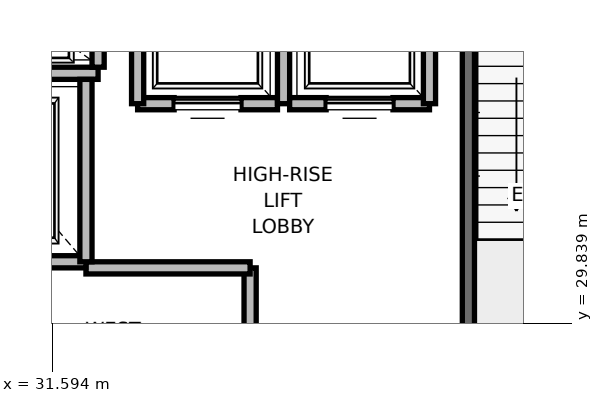
"""IFC4 building model, lengths in metres.
Left out: names, types, materials, properties, quantities, classifications, styles, units other than length and angle.
Written with IfcOpenShell. Run it as: python <this file> out.ifc"""

import sys

from ifc_helpers import new_model, si_unit, direction, frame, frame_2d, origin, place, context, subcontext, project, spatial, rectangle, extrude, element, fill, save


model = new_model("IFC4")
c1 = context("Model", 3, precision=1e-05, world=origin(), true_north=direction((0.0, 1.0)))
c2 = subcontext(c1, "Body", "Model", "MODEL_VIEW")
j1 = project(units=[si_unit("LENGTHUNIT", "METRE"), si_unit("PLANEANGLEUNIT", "RADIAN")], contexts=[c1])
p1 = place(None, origin())
s1 = spatial("IfcSite", under=j1, at=p1, CompositionType="ELEMENT")
p2 = place(p1, origin())
s2 = spatial("IfcBuilding", under=s1, at=p2, CompositionType="ELEMENT")
p3 = place(p2, frame((0.0, 0.0, 318.8)))
s3 = spatial("IfcBuildingStorey", under=s2, at=p3, CompositionType="ELEMENT", Elevation=318.8)
p4 = place(p3, frame((38.44, 27.38, 0.0), z_axis=(0.0, 0.0, 1.0), x_axis=(0.0, 1.0, 0.0)))
e1 = element("IfcWall", 1, at=p4, inside=s3, PredefinedType="SOLIDWALL", context=c2, shape_type="SweptSolid", body=[
    extrude(rectangle(XDim=8.87, YDim=0.2, at=frame_2d((4.435, 0.0))), origin(), (0.0, 0.0, 1.0), 3.785),
])
p5 = place(p3, frame((34.85, 27.38, 0.0), z_axis=(0.0, 0.0, 1.0), x_axis=(0.0, 1.0, 0.0)))
e2 = element("IfcWall", 2, at=p5, inside=s3, PredefinedType="PARTITIONING", context=c2, shape_type="SweptSolid", body=[
    extrude(rectangle(XDim=3.37, YDim=0.2, at=frame_2d((1.685, 0.0))), origin(), (0.0, 0.0, 1.0), 3.785),
])
p6 = place(p5, frame((1.11, 0.0, 0.0)))
e3 = element("IfcOpeningElement", 3, at=p6, cuts=e2, PredefinedType="OPENING", context=c2, shape_type="SweptSolid", body=[
    extrude(rectangle(XDim=1.15, YDim=2.2, at=frame_2d((0.575, 1.1))), frame((0.0, 0.1, 0.0), z_axis=(0.0, -1.0, 0.0), x_axis=(1.0, 0.0, 0.0)), (0.0, 0.0, 1.0), 0.2),
])
p7 = place(p3, frame((32.15, 30.75, 0.0), z_axis=(0.0, 0.0, 1.0), x_axis=(1.0, 0.0, 0.0)))
e4 = element("IfcWall", 4, at=p7, inside=s3, PredefinedType="PARTITIONING", context=c2, shape_type="SweptSolid", body=[
    extrude(rectangle(XDim=2.7, YDim=0.2, at=frame_2d((1.35, 0.0))), origin(), (0.0, 0.0, 1.0), 3.785),
])
p8 = place(p3, frame((29.55, 30.85, 0.0), z_axis=(0.0, 0.0, 1.0), x_axis=(1.0, 0.0, 0.0)))
e5 = element("IfcWall", 5, at=p8, inside=s3, PredefinedType="SOLIDWALL", context=c2, shape_type="SweptSolid", body=[
    extrude(rectangle(XDim=2.6, YDim=0.2, at=frame_2d((1.3, 0.0))), origin(), (0.0, 0.0, 1.0), 2.865),
])
p9 = place(p8, frame((0.75, 0.0, 0.0)))
e6 = element("IfcOpeningElement", 6, at=p9, cuts=e5, PredefinedType="OPENING", context=c2, shape_type="SweptSolid", body=[
    extrude(rectangle(XDim=1.1, YDim=2.2, at=frame_2d((0.55, 1.1))), frame((0.0, 0.1, 0.0), z_axis=(0.0, -1.0, 0.0), x_axis=(1.0, 0.0, 0.0)), (0.0, 0.0, 1.0), 0.2),
])
p10 = place(p3, frame((29.55, 33.95, 0.0), z_axis=(0.0, 0.0, 1.0), x_axis=(1.0, 0.0, 0.0)))
e7 = element("IfcWall", 7, at=p10, inside=s3, PredefinedType="SOLIDWALL", context=c2, shape_type="SweptSolid", body=[
    extrude(rectangle(XDim=2.8, YDim=0.2, at=frame_2d((1.4, 0.0))), origin(), (0.0, 0.0, 1.0), 3.785),
])
p11 = place(p3, frame((32.15, 30.85, 0.0), z_axis=(0.0, 0.0, 1.0), x_axis=(0.0, 1.0, 0.0)))
e8 = element("IfcWall", 8, at=p11, inside=s3, PredefinedType="SOLIDWALL", context=c2, shape_type="SweptSolid", body=[
    extrude(rectangle(XDim=3.0, YDim=0.2, at=frame_2d((1.5, 0.0))), origin(), (0.0, 0.0, 1.0), 3.785),
])
p12 = place(p3, frame((32.35, 34.05, 0.0), z_axis=(0.0, 0.0, 1.0), x_axis=(0.0, 1.0, 0.0)))
e9 = element("IfcWall", 9, at=p12, inside=s3, PredefinedType="SOLIDWALL", context=c2, shape_type="SweptSolid", body=[
    extrude(rectangle(XDim=2.1, YDim=0.2, at=frame_2d((1.05, 0.0))), origin(), (0.0, 0.0, 1.0), 3.785),
])
p13 = place(p12, frame((0.5, 0.0, 0.0)))
e10 = element("IfcOpeningElement", 10, at=p13, cuts=e9, PredefinedType="OPENING", context=c2, shape_type="SweptSolid", body=[
    extrude(rectangle(XDim=1.1, YDim=2.2, at=frame_2d((0.55, 1.1))), frame((0.0, 0.1, 0.0), z_axis=(0.0, -1.0, 0.0), x_axis=(1.0, 0.0, 0.0)), (0.0, 0.0, 1.0), 0.2),
])
p14 = place(p3, frame((33.0, 33.45, 0.0), z_axis=(0.0, 0.0, 1.0), x_axis=(1.0, 0.0, 0.0)))
e11 = element("IfcWall", 11, at=p14, inside=s3, PredefinedType="SOLIDWALL", context=c2, shape_type="SweptSolid", body=[
    extrude(rectangle(XDim=2.3, YDim=0.2, at=frame_2d((1.15, 0.0))), origin(), (0.0, 0.0, 1.0), 3.785),
])
p15 = place(p14, frame((0.6, 0.0, 0.0)))
e12 = element("IfcOpeningElement", 12, at=p15, cuts=e11, PredefinedType="OPENING", context=c2, shape_type="SweptSolid", body=[
    extrude(rectangle(XDim=1.1, YDim=2.2, at=frame_2d((0.55, 1.1))), frame((0.0, 0.1, 0.0), z_axis=(0.0, -1.0, 0.0), x_axis=(1.0, 0.0, 0.0)), (0.0, 0.0, 1.0), 0.2),
])
p16 = place(p3, frame((33.0, 36.05, 0.0), z_axis=(0.0, 0.0, 1.0), x_axis=(0.0, -1.0, 0.0)))
e13 = element("IfcWall", 13, at=p16, inside=s3, PredefinedType="SOLIDWALL", context=c2, shape_type="SweptSolid", body=[
    extrude(rectangle(XDim=2.6, YDim=0.2, at=frame_2d((1.3, 0.0))), origin(), (0.0, 0.0, 1.0), 3.785),
])
p17 = place(p3, frame((35.4, 33.45, 0.0), z_axis=(0.0, 0.0, 1.0), x_axis=(0.0, 1.0, 0.0)))
e14 = element("IfcWall", 14, at=p17, inside=s3, PredefinedType="SOLIDWALL", context=c2, shape_type="SweptSolid", body=[
    extrude(rectangle(XDim=2.6, YDim=0.2, at=frame_2d((1.3, 0.0))), origin(), (0.0, 0.0, 1.0), 2.865),
])
p18 = place(p3, frame((35.5, 33.45, 0.0), z_axis=(0.0, 0.0, 1.0), x_axis=(1.0, 0.0, 0.0)))
e15 = element("IfcWall", 15, at=p18, inside=s3, PredefinedType="SOLIDWALL", context=c2, shape_type="SweptSolid", body=[
    extrude(rectangle(XDim=2.3, YDim=0.2, at=frame_2d((1.15, 0.0))), origin(), (0.0, 0.0, 1.0), 3.785),
])
p19 = place(p18, frame((0.6, 0.0, 0.0)))
e16 = element("IfcOpeningElement", 16, at=p19, cuts=e15, PredefinedType="OPENING", context=c2, shape_type="SweptSolid", body=[
    extrude(rectangle(XDim=1.1, YDim=2.2, at=frame_2d((0.55, 1.1))), frame((0.0, 0.1, 0.0), z_axis=(0.0, -1.0, 0.0), x_axis=(1.0, 0.0, 0.0)), (0.0, 0.0, 1.0), 0.2),
])
p20 = place(p3, frame((37.8, 33.45, 0.0), z_axis=(0.0, 0.0, 1.0), x_axis=(0.0, 1.0, 0.0)))
e17 = element("IfcWall", 17, at=p20, inside=s3, PredefinedType="SOLIDWALL", context=c2, shape_type="SweptSolid", body=[
    extrude(rectangle(XDim=2.6, YDim=0.2, at=frame_2d((1.3, 0.0))), origin(), (0.0, 0.0, 1.0), 2.865),
])
p21 = place(p15, origin())
e18 = element("IfcDoor", 18, at=p21, inside=s3, OperationType="SLIDING_TO_RIGHT", PredefinedType="DOOR", context=c2, shape_type="SweptSolid", body=[
    extrude(rectangle(XDim=1.1, YDim=2.2, at=frame_2d((0.55, 1.1))), frame((0.0, 0.025, 0.0), z_axis=(0.0, -1.0, 0.0), x_axis=(1.0, 0.0, 0.0)), (0.0, 0.0, 1.0), 0.05),
])
fill(e12, e18)
p22 = place(p19, origin())
e19 = element("IfcDoor", 19, at=p22, inside=s3, OperationType="SLIDING_TO_RIGHT", PredefinedType="DOOR", context=c2, shape_type="SweptSolid", body=[
    extrude(rectangle(XDim=1.1, YDim=2.2, at=frame_2d((0.55, 1.1))), frame((0.0, 0.025, 0.0), z_axis=(0.0, -1.0, 0.0), x_axis=(1.0, 0.0, 0.0)), (0.0, 0.0, 1.0), 0.05),
])
fill(e16, e19)
save(model, sys.argv[1])
